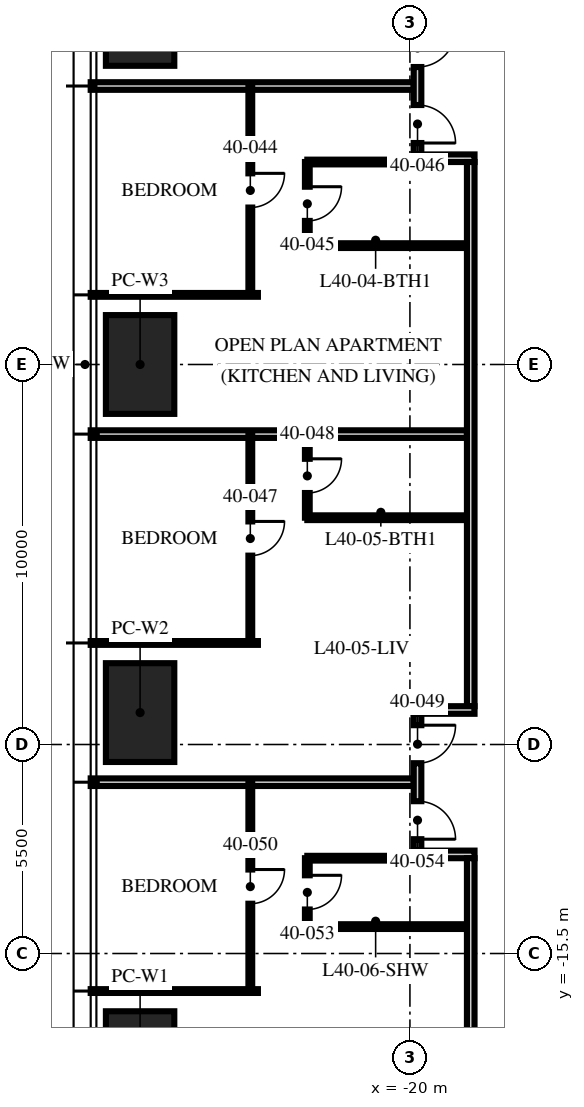
"""IFC4 building model, lengths in metres.
Left out: names, types, materials, properties, quantities, classifications, styles, units other than length and angle.
Written with IfcOpenShell. Run it as: python <this file> out.ifc"""

import sys

from ifc_helpers import new_model, si_unit, direction, frame, frame_2d, origin, origin_2d, place, context, subcontext, project, spatial, rectangle, extrude, element, fill, save


model = new_model("IFC4")
c1 = context("Model", 3, precision=1e-05, world=origin(), true_north=direction((0.0, 1.0)))
c2 = subcontext(c1, "Body", "Model", "MODEL_VIEW")
j1 = project(units=[si_unit("LENGTHUNIT", "METRE"), si_unit("PLANEANGLEUNIT", "RADIAN")], contexts=[c1])
p1 = place(None, origin())
s1 = spatial("IfcSite", under=j1, at=p1, CompositionType="ELEMENT")
p2 = place(p1, origin())
s2 = spatial("IfcBuilding", under=s1, at=p2, CompositionType="ELEMENT")
p3 = place(p2, frame((0.0, 0.0, 159.75)))
s3 = spatial("IfcBuildingStorey", under=s2, at=p3, CompositionType="ELEMENT", Elevation=159.75)
for number, where, z_axis, x_axis in (
    (1, (-27.1, -18.32, 0.0), (0.0, 0.0, 1.0), (0.0, 1.0, 0.0)),
    (2, (-27.1, -9.16, 0.0), (0.0, 0.0, 1.0), (0.0, 1.0, 0.0)),
    (3, (-27.1, 0.0, 0.0), (0.0, 0.0, 1.0), (0.0, 1.0, 0.0)),
    (4, (-27.1, 9.16, 0.0), (0.0, 0.0, 1.0), (0.0, 1.0, 0.0)),
):
    element("IfcColumn", number, at=place(p3, frame(where, z_axis=z_axis, x_axis=x_axis)), inside=s3, PredefinedType="COLUMN", context=c2, shape_type="SweptSolid", body=[
        extrude(rectangle(XDim=2.6, YDim=1.8, at=origin_2d()), origin(), (0.0, 0.0, 1.0), 3.75),
    ])
p4 = place(p3, frame((-19.9, 7.328, 0.0), z_axis=(0.0, 0.0, 1.0), x_axis=(-1.0, 0.0, 0.0)))
e5 = element("IfcWall", 5, at=p4, inside=s3, PredefinedType="PARTITIONING", context=c2, shape_type="SweptSolid", body=[
    extrude(rectangle(XDim=8.5, YDim=0.2, at=frame_2d((4.25, 0.0))), origin(), (0.0, 0.0, 1.0), 2.81),
])
p5 = place(p3, frame((-24.0, 1.832, 0.0), z_axis=(0.0, 0.0, 1.0), x_axis=(-1.0, 0.0, 0.0)))
e6 = element("IfcWall", 6, at=p5, inside=s3, PredefinedType="PARTITIONING", context=c2, shape_type="SweptSolid", body=[
    extrude(rectangle(XDim=4.4, YDim=0.1, at=frame_2d((2.2, 0.0))), origin(), (0.0, 0.0, 1.0), 2.81),
])
p6 = place(p3, frame((-18.5, -1.832, 0.0), z_axis=(0.0, 0.0, 1.0), x_axis=(-1.0, 0.0, 0.0)))
e7 = element("IfcWall", 7, at=p6, inside=s3, PredefinedType="PARTITIONING", context=c2, shape_type="SweptSolid", body=[
    extrude(rectangle(XDim=9.9, YDim=0.2, at=frame_2d((4.95, 0.0))), origin(), (0.0, 0.0, 1.0), 2.81),
])
p7 = place(p3, frame((-24.0, -7.328, 0.0), z_axis=(0.0, 0.0, 1.0), x_axis=(-1.0, 0.0, 0.0)))
e8 = element("IfcWall", 8, at=p7, inside=s3, PredefinedType="PARTITIONING", context=c2, shape_type="SweptSolid", body=[
    extrude(rectangle(XDim=4.4, YDim=0.1, at=frame_2d((2.2, 0.0))), origin(), (0.0, 0.0, 1.0), 2.81),
])
p8 = place(p3, frame((-19.9, -10.992, 0.0), z_axis=(0.0, 0.0, 1.0), x_axis=(-1.0, 0.0, 0.0)))
e9 = element("IfcWall", 9, at=p8, inside=s3, PredefinedType="PARTITIONING", context=c2, shape_type="SweptSolid", body=[
    extrude(rectangle(XDim=8.5, YDim=0.2, at=frame_2d((4.25, 0.0))), origin(), (0.0, 0.0, 1.0), 2.81),
])
p9 = place(p3, frame((-24.0, -16.488, 0.0), z_axis=(0.0, 0.0, 1.0), x_axis=(-1.0, 0.0, 0.0)))
e10 = element("IfcWall", 10, at=p9, inside=s3, PredefinedType="PARTITIONING", context=c2, shape_type="SweptSolid", body=[
    extrude(rectangle(XDim=4.4, YDim=0.1, at=frame_2d((2.2, 0.0))), origin(), (0.0, 0.0, 1.0), 2.81),
])
p10 = place(p3, frame((-24.2, 7.328, 0.0), z_axis=(0.0, 0.0, 1.0), x_axis=(0.0, -1.0, 0.0)))
e11 = element("IfcWall", 11, at=p10, inside=s3, PredefinedType="PARTITIONING", context=c2, shape_type="SweptSolid", body=[
    extrude(rectangle(XDim=5.496, YDim=0.1, at=frame_2d((2.748, 0.0))), origin(), (0.0, 0.0, 1.0), 2.81),
])
p11 = place(p10, frame((2.298, 0.0, 0.0)))
e12 = element("IfcOpeningElement", 12, at=p11, cuts=e11, PredefinedType="OPENING", context=c2, shape_type="SweptSolid", body=[
    extrude(rectangle(XDim=0.9, YDim=2.1, at=frame_2d((0.45, 1.05))), frame((0.0, 0.06, 0.0), z_axis=(0.0, -1.0, 0.0), x_axis=(1.0, 0.0, 0.0)), (0.0, 0.0, 1.0), 0.12),
])
p12 = place(p3, frame((-22.7, 5.328, 0.0), z_axis=(0.0, 0.0, 1.0), x_axis=(0.0, -1.0, 0.0)))
e13 = element("IfcWall", 13, at=p12, inside=s3, PredefinedType="PARTITIONING", context=c2, shape_type="SweptSolid", body=[
    extrude(rectangle(XDim=2.2, YDim=0.125, at=frame_2d((1.1, 0.0))), origin(), (0.0, 0.0, 1.0), 2.81),
])
p13 = place(p12, frame((0.65, 0.0, 0.0)))
e14 = element("IfcOpeningElement", 14, at=p13, cuts=e13, PredefinedType="OPENING", context=c2, shape_type="SweptSolid", body=[
    extrude(rectangle(XDim=0.9, YDim=2.1, at=frame_2d((0.45, 1.05))), frame((0.0, 0.073, 0.0), z_axis=(0.0, -1.0, 0.0), x_axis=(1.0, 0.0, 0.0)), (0.0, 0.0, 1.0), 0.145),
])
p14 = place(p3, frame((-19.97, 5.328, 0.0), z_axis=(0.0, 0.0, 1.0), x_axis=(-1.0, 0.0, 0.0)))
e15 = element("IfcWall", 15, at=p14, inside=s3, PredefinedType="PARTITIONING", context=c2, shape_type="SweptSolid", body=[
    extrude(rectangle(XDim=2.73, YDim=0.125, at=frame_2d((1.365, 0.0))), origin(), (0.0, 0.0, 1.0), 3.5),
])
p15 = place(p3, frame((-18.5, 3.128, 0.0), z_axis=(0.0, 0.0, 1.0), x_axis=(-1.0, 0.0, 0.0)))
e16 = element("IfcWall", 16, at=p15, inside=s3, PredefinedType="PARTITIONING", context=c2, shape_type="SweptSolid", body=[
    extrude(rectangle(XDim=4.2, YDim=0.125, at=frame_2d((2.1, 0.0))), origin(), (0.0, 0.0, 1.0), 3.5),
])
p16 = place(p3, frame((-24.2, -1.832, 0.0), z_axis=(0.0, 0.0, 1.0), x_axis=(0.0, -1.0, 0.0)))
e17 = element("IfcWall", 17, at=p16, inside=s3, PredefinedType="PARTITIONING", context=c2, shape_type="SweptSolid", body=[
    extrude(rectangle(XDim=5.496, YDim=0.1, at=frame_2d((2.748, 0.0))), origin(), (0.0, 0.0, 1.0), 2.81),
])
p17 = place(p16, frame((2.298, 0.0, 0.0)))
e18 = element("IfcOpeningElement", 18, at=p17, cuts=e17, PredefinedType="OPENING", context=c2, shape_type="SweptSolid", body=[
    extrude(rectangle(XDim=0.9, YDim=2.1, at=frame_2d((0.45, 1.05))), frame((0.0, 0.06, 0.0), z_axis=(0.0, -1.0, 0.0), x_axis=(1.0, 0.0, 0.0)), (0.0, 0.0, 1.0), 0.12),
])
p18 = place(p3, frame((-22.7, -1.832, 0.0), z_axis=(0.0, 0.0, 1.0), x_axis=(0.0, -1.0, 0.0)))
e19 = element("IfcWall", 19, at=p18, inside=s3, PredefinedType="PARTITIONING", context=c2, shape_type="SweptSolid", body=[
    extrude(rectangle(XDim=2.2, YDim=0.125, at=frame_2d((1.1, 0.0))), origin(), (0.0, 0.0, 1.0), 3.5),
])
p19 = place(p18, frame((0.65, 0.0, 0.0)))
e20 = element("IfcOpeningElement", 20, at=p19, cuts=e19, PredefinedType="OPENING", context=c2, shape_type="SweptSolid", body=[
    extrude(rectangle(XDim=0.9, YDim=2.1, at=frame_2d((0.45, 1.05))), frame((0.0, 0.073, 0.0), z_axis=(0.0, -1.0, 0.0), x_axis=(1.0, 0.0, 0.0)), (0.0, 0.0, 1.0), 0.145),
])
p20 = place(p3, frame((-18.5, -4.032, 0.0), z_axis=(0.0, 0.0, 1.0), x_axis=(-1.0, 0.0, 0.0)))
e21 = element("IfcWall", 21, at=p20, inside=s3, PredefinedType="PARTITIONING", context=c2, shape_type="SweptSolid", body=[
    extrude(rectangle(XDim=4.2, YDim=0.125, at=frame_2d((2.1, 0.0))), origin(), (0.0, 0.0, 1.0), 3.5),
])
p21 = place(p3, frame((-24.2, -10.992, 0.0), z_axis=(0.0, 0.0, 1.0), x_axis=(0.0, -1.0, 0.0)))
e22 = element("IfcWall", 22, at=p21, inside=s3, PredefinedType="PARTITIONING", context=c2, shape_type="SweptSolid", body=[
    extrude(rectangle(XDim=5.496, YDim=0.1, at=frame_2d((2.748, 0.0))), origin(), (0.0, 0.0, 1.0), 2.81),
])
p22 = place(p21, frame((2.298, 0.0, 0.0)))
e23 = element("IfcOpeningElement", 23, at=p22, cuts=e22, PredefinedType="OPENING", context=c2, shape_type="SweptSolid", body=[
    extrude(rectangle(XDim=0.9, YDim=2.1, at=frame_2d((0.45, 1.05))), frame((0.0, 0.06, 0.0), z_axis=(0.0, -1.0, 0.0), x_axis=(1.0, 0.0, 0.0)), (0.0, 0.0, 1.0), 0.12),
])
p23 = place(p3, frame((-22.7, -12.992, 0.0), z_axis=(0.0, 0.0, 1.0), x_axis=(0.0, -1.0, 0.0)))
e24 = element("IfcWall", 24, at=p23, inside=s3, PredefinedType="PARTITIONING", context=c2, shape_type="SweptSolid", body=[
    extrude(rectangle(XDim=1.8, YDim=0.125, at=frame_2d((0.9, 0.0))), origin(), (0.0, 0.0, 1.0), 2.81),
])
p24 = place(p23, frame((0.45, 0.0, 0.0)))
e25 = element("IfcOpeningElement", 25, at=p24, cuts=e24, PredefinedType="OPENING", context=c2, shape_type="SweptSolid", body=[
    extrude(rectangle(XDim=0.9, YDim=2.1, at=frame_2d((0.45, 1.05))), frame((0.0, 0.073, 0.0), z_axis=(0.0, -1.0, 0.0), x_axis=(1.0, 0.0, 0.0)), (0.0, 0.0, 1.0), 0.145),
])
p25 = place(p3, frame((-19.97, -12.992, 0.0), z_axis=(0.0, 0.0, 1.0), x_axis=(-1.0, 0.0, 0.0)))
e26 = element("IfcWall", 26, at=p25, inside=s3, PredefinedType="PARTITIONING", context=c2, shape_type="SweptSolid", body=[
    extrude(rectangle(XDim=2.73, YDim=0.125, at=frame_2d((1.365, 0.0))), origin(), (0.0, 0.0, 1.0), 3.5),
])
p26 = place(p3, frame((-18.5, -14.792, 0.0), z_axis=(0.0, 0.0, 1.0), x_axis=(-1.0, 0.0, 0.0)))
e27 = element("IfcWall", 27, at=p26, inside=s3, PredefinedType="PARTITIONING", context=c2, shape_type="SweptSolid", body=[
    extrude(rectangle(XDim=4.2, YDim=0.125, at=frame_2d((2.1, 0.0))), origin(), (0.0, 0.0, 1.0), 3.5),
])
p27 = place(p3, frame((-18.3, 5.428, 0.0), z_axis=(0.0, 0.0, 1.0), x_axis=(-1.0, 0.0, 0.0)))
e28 = element("IfcWall", 28, at=p27, inside=s3, PredefinedType="PARTITIONING", context=c2, shape_type="SweptSolid", body=[
    extrude(rectangle(XDim=1.6, YDim=0.2, at=frame_2d((0.8, 0.0))), origin(), (0.0, 0.0, 1.0), 3.5),
])
p28 = place(p3, frame((-19.8, 9.128, 0.0), z_axis=(0.0, 0.0, 1.0), x_axis=(0.0, -1.0, 0.0)))
e29 = element("IfcWall", 29, at=p28, inside=s3, PredefinedType="PARTITIONING", context=c2, shape_type="SweptSolid", body=[
    extrude(rectangle(XDim=3.6, YDim=0.2, at=frame_2d((1.8, 0.0))), origin(), (0.0, 0.0, 1.0), 2.7),
])
p29 = place(p28, frame((0.3, 0.0, 0.0)))
e30 = element("IfcOpeningElement", 30, at=p29, cuts=e29, PredefinedType="OPENING", context=c2, shape_type="SweptSolid", body=[
    extrude(rectangle(XDim=1.0, YDim=2.2, at=frame_2d((0.5, 1.1))), frame((0.0, 0.11, 0.0), z_axis=(0.0, -1.0, 0.0), x_axis=(1.0, 0.0, 0.0)), (0.0, 0.0, 1.0), 0.22),
])
p30 = place(p28, frame((2.3, 0.0, 0.0)))
e31 = element("IfcOpeningElement", 31, at=p30, cuts=e29, PredefinedType="OPENING", context=c2, shape_type="SweptSolid", body=[
    extrude(rectangle(XDim=1.0, YDim=2.2, at=frame_2d((0.5, 1.1))), frame((0.0, 0.11, 0.0), z_axis=(0.0, -1.0, 0.0), x_axis=(1.0, 0.0, 0.0)), (0.0, 0.0, 1.0), 0.22),
])
p31 = place(p3, frame((-18.4, 5.328, 0.0), z_axis=(0.0, 0.0, 1.0), x_axis=(0.0, -1.0, 0.0)))
e32 = element("IfcWall", 32, at=p31, inside=s3, PredefinedType="PARTITIONING", context=c2, shape_type="SweptSolid", body=[
    extrude(rectangle(XDim=14.32, YDim=0.2, at=frame_2d((7.16, 0.0))), origin(), (0.0, 0.0, 1.0), 2.7),
])
p32 = place(p3, frame((-18.3, -9.092, 0.0), z_axis=(0.0, 0.0, 1.0), x_axis=(-1.0, 0.0, 0.0)))
e33 = element("IfcWall", 33, at=p32, inside=s3, PredefinedType="PARTITIONING", context=c2, shape_type="SweptSolid", body=[
    extrude(rectangle(XDim=1.6, YDim=0.2, at=frame_2d((0.8, 0.0))), origin(), (0.0, 0.0, 1.0), 2.7),
])
p33 = place(p3, frame((-18.3, -12.892, 0.0), z_axis=(0.0, 0.0, 1.0), x_axis=(-1.0, 0.0, 0.0)))
e34 = element("IfcWall", 34, at=p33, inside=s3, PredefinedType="PARTITIONING", context=c2, shape_type="SweptSolid", body=[
    extrude(rectangle(XDim=1.6, YDim=0.2, at=frame_2d((0.8, 0.0))), origin(), (0.0, 0.0, 1.0), 3.5),
])
p34 = place(p3, frame((-19.8, -9.192, 0.0), z_axis=(0.0, 0.0, 1.0), x_axis=(0.0, -1.0, 0.0)))
e35 = element("IfcWall", 35, at=p34, inside=s3, PredefinedType="PARTITIONING", context=c2, shape_type="SweptSolid", body=[
    extrude(rectangle(XDim=3.6, YDim=0.2, at=frame_2d((1.8, 0.0))), origin(), (0.0, 0.0, 1.0), 2.7),
])
p35 = place(p34, frame((0.3, 0.0, 0.0)))
e36 = element("IfcOpeningElement", 36, at=p35, cuts=e35, PredefinedType="OPENING", context=c2, shape_type="SweptSolid", body=[
    extrude(rectangle(XDim=1.0, YDim=2.2, at=frame_2d((0.5, 1.1))), frame((0.0, 0.11, 0.0), z_axis=(0.0, -1.0, 0.0), x_axis=(1.0, 0.0, 0.0)), (0.0, 0.0, 1.0), 0.22),
])
p36 = place(p34, frame((2.3, 0.0, 0.0)))
e37 = element("IfcOpeningElement", 37, at=p36, cuts=e35, PredefinedType="OPENING", context=c2, shape_type="SweptSolid", body=[
    extrude(rectangle(XDim=1.0, YDim=2.2, at=frame_2d((0.5, 1.1))), frame((0.0, 0.11, 0.0), z_axis=(0.0, -1.0, 0.0), x_axis=(1.0, 0.0, 0.0)), (0.0, 0.0, 1.0), 0.22),
])
p37 = place(p3, frame((-18.4, -12.992, 0.0), z_axis=(0.0, 0.0, 1.0), x_axis=(0.0, -1.0, 0.0)))
e38 = element("IfcWall", 38, at=p37, inside=s3, PredefinedType="PARTITIONING", context=c2, shape_type="SweptSolid", body=[
    extrude(rectangle(XDim=5.308, YDim=0.2, at=frame_2d((2.654, 0.0))), origin(), (0.0, 0.0, 1.0), 2.3),
])
p38 = place(p29, origin())
e39 = element("IfcDoor", 39, at=p38, inside=s3, OperationType="SINGLE_SWING_LEFT", PredefinedType="DOOR", context=c2, shape_type="SweptSolid", body=[
    extrude(rectangle(XDim=1.0, YDim=2.2, at=frame_2d((0.5, 1.1))), frame((0.0, 0.025, 0.0), z_axis=(0.0, -1.0, 0.0), x_axis=(1.0, 0.0, 0.0)), (0.0, 0.0, 1.0), 0.05),
])
fill(e30, e39)
p39 = place(p11, origin())
e40 = element("IfcDoor", 40, at=p39, inside=s3, OperationType="SINGLE_SWING_LEFT", PredefinedType="DOOR", context=c2, shape_type="SweptSolid", body=[
    extrude(rectangle(XDim=0.9, YDim=2.1, at=frame_2d((0.45, 1.05))), frame((0.0, 0.025, 0.0), z_axis=(0.0, -1.0, 0.0), x_axis=(1.0, 0.0, 0.0)), (0.0, 0.0, 1.0), 0.05),
])
fill(e12, e40)
p40 = place(p13, origin())
e41 = element("IfcDoor", 41, at=p40, inside=s3, OperationType="SINGLE_SWING_LEFT", PredefinedType="DOOR", context=c2, shape_type="SweptSolid", body=[
    extrude(rectangle(XDim=0.9, YDim=2.1, at=frame_2d((0.45, 1.05))), frame((0.0, 0.025, 0.0), z_axis=(0.0, -1.0, 0.0), x_axis=(1.0, 0.0, 0.0)), (0.0, 0.0, 1.0), 0.05),
])
fill(e14, e41)
p41 = place(p30, origin())
e42 = element("IfcDoor", 42, at=p41, inside=s3, OperationType="SINGLE_SWING_RIGHT", PredefinedType="DOOR", context=c2, shape_type="SweptSolid", body=[
    extrude(rectangle(XDim=1.0, YDim=2.2, at=frame_2d((0.5, 1.1))), frame((0.0, 0.025, 0.0), z_axis=(0.0, -1.0, 0.0), x_axis=(1.0, 0.0, 0.0)), (0.0, 0.0, 1.0), 0.05),
])
fill(e31, e42)
p42 = place(p17, origin())
e43 = element("IfcDoor", 43, at=p42, inside=s3, OperationType="SINGLE_SWING_LEFT", PredefinedType="DOOR", context=c2, shape_type="SweptSolid", body=[
    extrude(rectangle(XDim=0.9, YDim=2.1, at=frame_2d((0.45, 1.05))), frame((0.0, 0.025, 0.0), z_axis=(0.0, -1.0, 0.0), x_axis=(1.0, 0.0, 0.0)), (0.0, 0.0, 1.0), 0.05),
])
fill(e18, e43)
p43 = place(p19, origin())
e44 = element("IfcDoor", 44, at=p43, inside=s3, OperationType="SINGLE_SWING_LEFT", PredefinedType="DOOR", context=c2, shape_type="SweptSolid", body=[
    extrude(rectangle(XDim=0.9, YDim=2.1, at=frame_2d((0.45, 1.05))), frame((0.0, 0.025, 0.0), z_axis=(0.0, -1.0, 0.0), x_axis=(1.0, 0.0, 0.0)), (0.0, 0.0, 1.0), 0.05),
])
fill(e20, e44)
p44 = place(p35, origin())
e45 = element("IfcDoor", 45, at=p44, inside=s3, OperationType="SINGLE_SWING_LEFT", PredefinedType="DOOR", context=c2, shape_type="SweptSolid", body=[
    extrude(rectangle(XDim=1.0, YDim=2.2, at=frame_2d((0.5, 1.1))), frame((0.0, 0.025, 0.0), z_axis=(0.0, -1.0, 0.0), x_axis=(1.0, 0.0, 0.0)), (0.0, 0.0, 1.0), 0.05),
])
fill(e36, e45)
p45 = place(p22, origin())
e46 = element("IfcDoor", 46, at=p45, inside=s3, OperationType="SINGLE_SWING_LEFT", PredefinedType="DOOR", context=c2, shape_type="SweptSolid", body=[
    extrude(rectangle(XDim=0.9, YDim=2.1, at=frame_2d((0.45, 1.05))), frame((0.0, 0.025, 0.0), z_axis=(0.0, -1.0, 0.0), x_axis=(1.0, 0.0, 0.0)), (0.0, 0.0, 1.0), 0.05),
])
fill(e23, e46)
p46 = place(p24, origin())
e47 = element("IfcDoor", 47, at=p46, inside=s3, OperationType="SINGLE_SWING_LEFT", PredefinedType="DOOR", context=c2, shape_type="SweptSolid", body=[
    extrude(rectangle(XDim=0.9, YDim=2.1, at=frame_2d((0.45, 1.05))), frame((0.0, 0.025, 0.0), z_axis=(0.0, -1.0, 0.0), x_axis=(1.0, 0.0, 0.0)), (0.0, 0.0, 1.0), 0.05),
])
fill(e25, e47)
p47 = place(p36, origin())
e48 = element("IfcDoor", 48, at=p47, inside=s3, OperationType="SINGLE_SWING_RIGHT", PredefinedType="DOOR", context=c2, shape_type="SweptSolid", body=[
    extrude(rectangle(XDim=1.0, YDim=2.2, at=frame_2d((0.5, 1.1))), frame((0.0, 0.025, 0.0), z_axis=(0.0, -1.0, 0.0), x_axis=(1.0, 0.0, 0.0)), (0.0, 0.0, 1.0), 0.05),
])
fill(e37, e48)
save(model, sys.argv[1])
